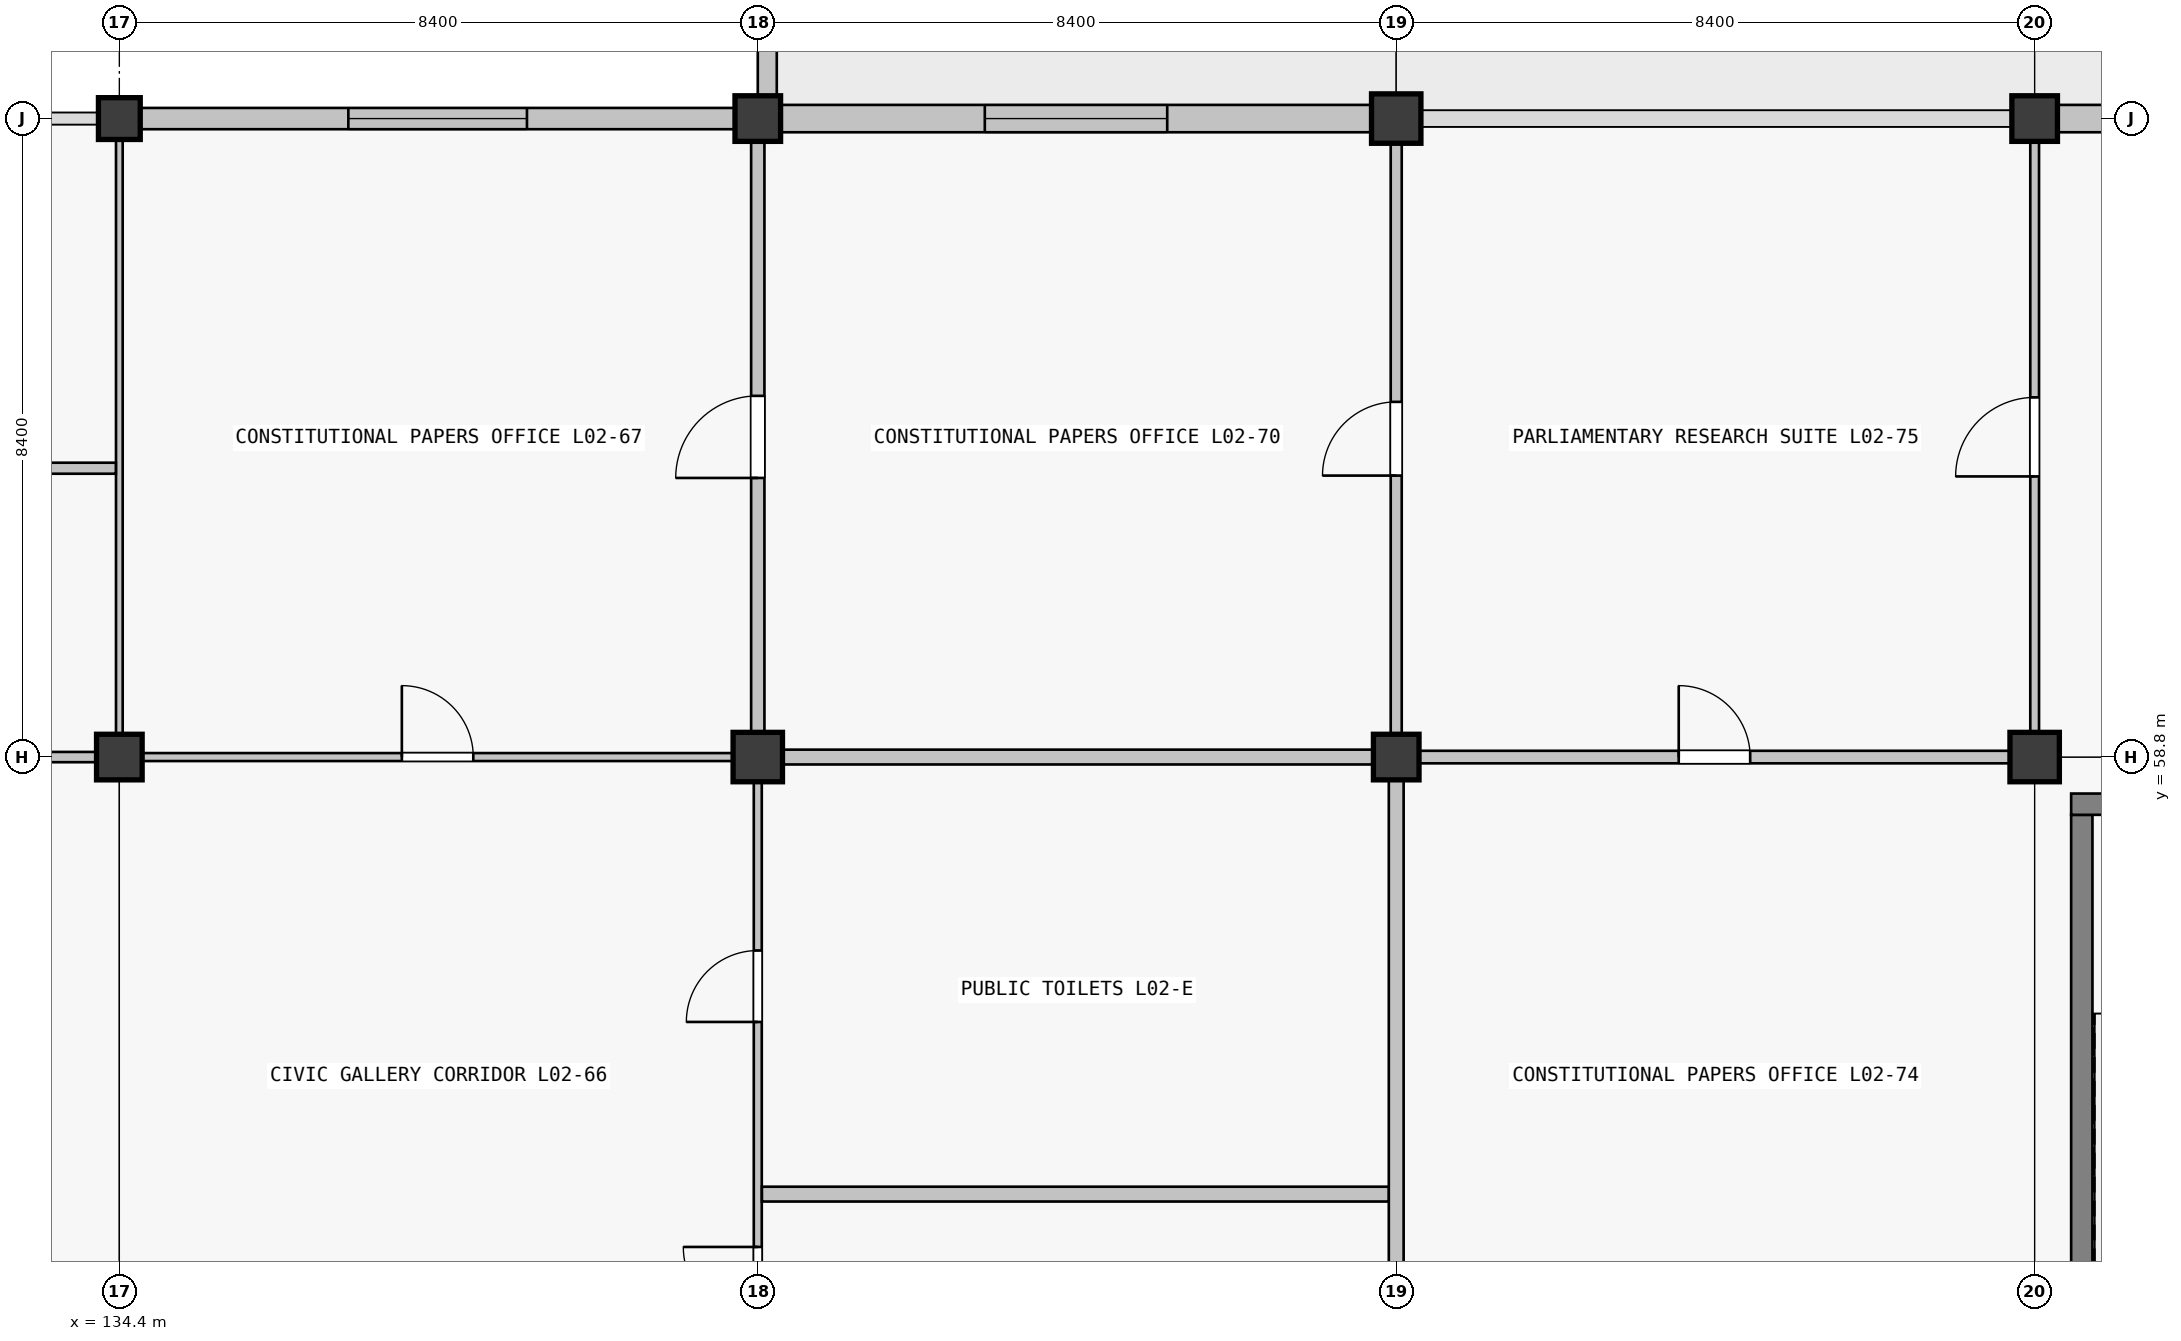
"""IFC4 building model, lengths in metres.
Left out: names, types, materials, properties, quantities, classifications, styles, units other than length and angle.
Written with IfcOpenShell. Run it as: python <this file> out.ifc"""

import sys

from ifc_helpers import new_model, si_unit, direction, frame, frame_2d, origin, origin_2d, place, context, subcontext, project, spatial, rectangle, extrude, element, fill, save


model = new_model("IFC4")
c1 = context("Model", 3, precision=1e-05, world=origin(), true_north=direction((0.0, 1.0)))
c2 = subcontext(c1, "Body", "Model", "MODEL_VIEW")
j1 = project(units=[si_unit("LENGTHUNIT", "METRE"), si_unit("PLANEANGLEUNIT", "RADIAN")], contexts=[c1])
p1 = place(None, origin())
s1 = spatial("IfcSite", under=j1, at=p1, CompositionType="ELEMENT")
p2 = place(p1, origin())
s2 = spatial("IfcBuilding", under=s1, at=p2, CompositionType="ELEMENT")
p3 = place(p2, frame((0.0, 0.0, 10.26)))
s3 = spatial("IfcBuildingStorey", under=s2, at=p3, CompositionType="ELEMENT", Elevation=10.26)
p4 = place(p3, frame((134.4, 58.8, 0.0), z_axis=(0.0, 0.0, 1.0), x_axis=(1.0, 0.0, 0.0)))
e1 = element("IfcColumn", 1, at=p4, inside=s3, PredefinedType="COLUMN", context=c2, shape_type="SweptSolid", body=[
    extrude(rectangle(XDim=0.6, YDim=0.6, at=origin_2d()), origin(), (0.0, 0.0, 1.0), 4.5),
])
p5 = place(p3, frame((134.4, 67.2, 0.0), z_axis=(0.0, 0.0, 1.0), x_axis=(1.0, 0.0, 0.0)))
e2 = element("IfcColumn", 2, at=p5, inside=s3, PredefinedType="COLUMN", context=c2, shape_type="SweptSolid", body=[
    extrude(rectangle(XDim=0.55, YDim=0.55, at=origin_2d()), origin(), (0.0, 0.0, 1.0), 4.25),
])
p6 = place(p3, frame((142.8, 58.8, 0.0), z_axis=(0.0, 0.0, 1.0), x_axis=(1.0, 0.0, 0.0)))
e3 = element("IfcColumn", 3, at=p6, inside=s3, PredefinedType="COLUMN", context=c2, shape_type="SweptSolid", body=[
    extrude(rectangle(XDim=0.65, YDim=0.65, at=origin_2d()), origin(), (0.0, 0.0, 1.0), 4.5),
])
for number, where, z_axis, x_axis in (
    (4, (142.8, 67.2, 0.0), (0.0, 0.0, 1.0), (1.0, 0.0, 0.0)),
    (5, (151.2, 58.8, 0.0), (0.0, 0.0, 1.0), (1.0, 0.0, 0.0)),
):
    element("IfcColumn", number, at=place(p3, frame(where, z_axis=z_axis, x_axis=x_axis)), inside=s3, PredefinedType="COLUMN", context=c2, shape_type="SweptSolid", body=[
        extrude(rectangle(XDim=0.6, YDim=0.6, at=origin_2d()), origin(), (0.0, 0.0, 1.0), 4.5),
    ])
for number, where, z_axis, x_axis in (
    (6, (151.2, 67.2, 0.0), (0.0, 0.0, 1.0), (1.0, 0.0, 0.0)),
    (7, (159.6, 58.8, 0.0), (0.0, 0.0, 1.0), (1.0, 0.0, 0.0)),
):
    element("IfcColumn", number, at=place(p3, frame(where, z_axis=z_axis, x_axis=x_axis)), inside=s3, PredefinedType="COLUMN", context=c2, shape_type="SweptSolid", body=[
        extrude(rectangle(XDim=0.65, YDim=0.65, at=origin_2d()), origin(), (0.0, 0.0, 1.0), 4.5),
    ])
p7 = place(p3, frame((159.6, 67.2, 0.0), z_axis=(0.0, 0.0, 1.0), x_axis=(1.0, 0.0, 0.0)))
e8 = element("IfcColumn", 8, at=p7, inside=s3, PredefinedType="COLUMN", context=c2, shape_type="SweptSolid", body=[
    extrude(rectangle(XDim=0.6, YDim=0.6, at=origin_2d()), origin(), (0.0, 0.0, 1.0), 4.5),
])
p8 = place(p3, frame((134.676, 67.2, 0.0), z_axis=(0.0, 0.0, 1.0), x_axis=(1.0, 0.0, 0.0)))
e9 = element("IfcWall", 9, at=p8, inside=s3, PredefinedType="SOLIDWALL", context=c2, shape_type="SweptSolid", body=[
    extrude(rectangle(XDim=7.823, YDim=0.28, at=frame_2d((3.912, 0.0))), origin(), (0.0, 0.0, 1.0), 3.54),
])
p9 = place(p8, frame((2.737, 0.0, 0.9)))
e10 = element("IfcOpeningElement", 10, at=p9, cuts=e9, PredefinedType="OPENING", context=c2, shape_type="SweptSolid", body=[
    extrude(rectangle(XDim=2.35, YDim=1.6, at=frame_2d((1.175, 0.8))), frame((0.0, 0.14, 0.0), z_axis=(0.0, -1.0, 0.0), x_axis=(1.0, 0.0, 0.0)), (0.0, 0.0, 1.0), 0.28),
])
p10 = place(p3, frame((143.101, 67.2, 0.0), z_axis=(0.0, 0.0, 1.0), x_axis=(1.0, 0.0, 0.0)))
e11 = element("IfcWall", 11, at=p10, inside=s3, PredefinedType="SOLIDWALL", context=c2, shape_type="SweptSolid", body=[
    extrude(rectangle(XDim=7.773, YDim=0.36, at=frame_2d((3.886, 0.0))), origin(), (0.0, 0.0, 1.0), 3.54),
])
p11 = place(p10, frame((2.686, 0.0, 0.9)))
e12 = element("IfcOpeningElement", 12, at=p11, cuts=e11, PredefinedType="OPENING", context=c2, shape_type="SweptSolid", body=[
    extrude(rectangle(XDim=2.4, YDim=1.8, at=frame_2d((1.2, 0.9))), frame((0.0, 0.18, 0.0), z_axis=(0.0, -1.0, 0.0), x_axis=(1.0, 0.0, 0.0)), (0.0, 0.0, 1.0), 0.36),
])
p12 = place(p3, frame((159.901, 67.2, 0.0), z_axis=(0.0, 0.0, 1.0), x_axis=(1.0, 0.0, 0.0)))
e13 = element("IfcWall", 13, at=p12, inside=s3, PredefinedType="SOLIDWALL", context=c2, shape_type="SweptSolid", body=[
    extrude(rectangle(XDim=7.773, YDim=0.36, at=frame_2d((3.887, 0.0))), origin(), (0.0, 0.0, 1.0), 3.54),
])
p13 = place(p12, frame((3.286, 0.0, 0.9)))
e14 = element("IfcOpeningElement", 14, at=p13, cuts=e13, PredefinedType="OPENING", context=c2, shape_type="SweptSolid", body=[
    extrude(rectangle(XDim=1.2, YDim=2.1, at=frame_2d((0.6, 1.05))), frame((0.0, 0.18, 0.0), z_axis=(0.0, -1.0, 0.0), x_axis=(1.0, 0.0, 0.0)), (0.0, 0.0, 1.0), 0.36),
])
p14 = place(p3, frame((142.925, 67.46, 0.0), z_axis=(0.0, 0.0, 1.0), x_axis=(0.0, 1.0, 0.0)))
e15 = element("IfcWall", 15, at=p14, inside=s3, PredefinedType="PARAPET", context=c2, shape_type="SweptSolid", body=[
    extrude(rectangle(XDim=7.88, YDim=0.25, at=frame_2d((3.94, 0.0))), origin(), (0.0, 0.0, 1.0), 0.95),
])
p15 = place(p3, frame((160.22, 51.16, 0.0), z_axis=(0.0, 0.0, 1.0), x_axis=(0.0, 1.0, 0.0)))
e16 = element("IfcWall", 16, at=p15, inside=s3, PredefinedType="SHEAR", context=c2, shape_type="SweptSolid", body=[
    extrude(rectangle(XDim=6.88, YDim=0.28, at=frame_2d((3.44, 0.0))), origin(), (0.0, 0.0, 1.0), 4.5),
])
p16 = place(p3, frame((160.08, 58.18, 0.0), z_axis=(0.0, 0.0, 1.0), x_axis=(1.0, 0.0, 0.0)))
e17 = element("IfcWall", 17, at=p16, inside=s3, PredefinedType="SHEAR", context=c2, shape_type="SweptSolid", body=[
    extrude(rectangle(XDim=7.44, YDim=0.28, at=frame_2d((3.72, 0.0))), origin(), (0.0, 0.0, 1.0), 4.5),
])
p17 = place(p3, frame((126.327, 58.8, 0.0), z_axis=(0.0, 0.0, 1.0), x_axis=(1.0, 0.0, 0.0)))
e18 = element("IfcWall", 18, at=p17, inside=s3, PredefinedType="PARTITIONING", context=c2, shape_type="SweptSolid", body=[
    extrude(rectangle(XDim=7.771, YDim=0.135, at=frame_2d((3.885, 0.0))), origin(), (0.0, 0.0, 1.0), 3.37),
])
p18 = place(p3, frame((134.702, 58.8, 0.0), z_axis=(0.0, 0.0, 1.0), x_axis=(1.0, 0.0, 0.0)))
e19 = element("IfcWall", 19, at=p18, inside=s3, PredefinedType="PARTITIONING", context=c2, shape_type="SweptSolid", body=[
    extrude(rectangle(XDim=7.771, YDim=0.105, at=frame_2d((3.885, 0.0))), origin(), (0.0, 0.0, 1.0), 3.37),
])
p19 = place(p18, frame((3.415, 0.0, 0.0)))
e20 = element("IfcOpeningElement", 20, at=p19, cuts=e19, PredefinedType="OPENING", context=c2, shape_type="SweptSolid", body=[
    extrude(rectangle(XDim=0.94, YDim=2.15, at=frame_2d((0.47, 1.075))), frame((0.0, 0.052, 0.0), z_axis=(0.0, -1.0, 0.0), x_axis=(1.0, 0.0, 0.0)), (0.0, 0.0, 1.0), 0.105),
])
p20 = place(p3, frame((143.127, 58.8, 0.0), z_axis=(0.0, 0.0, 1.0), x_axis=(1.0, 0.0, 0.0)))
e21 = element("IfcWall", 21, at=p20, inside=s3, PredefinedType="PARTITIONING", context=c2, shape_type="SweptSolid", body=[
    extrude(rectangle(XDim=7.771, YDim=0.195, at=frame_2d((3.885, 0.0))), origin(), (0.0, 0.0, 1.0), 3.37),
])
p21 = place(p3, frame((151.502, 58.8, 0.0), z_axis=(0.0, 0.0, 1.0), x_axis=(1.0, 0.0, 0.0)))
e22 = element("IfcWall", 22, at=p21, inside=s3, PredefinedType="PARTITIONING", context=c2, shape_type="SweptSolid", body=[
    extrude(rectangle(XDim=7.771, YDim=0.165, at=frame_2d((3.885, 0.0))), origin(), (0.0, 0.0, 1.0), 3.37),
])
p22 = place(p21, frame((3.415, 0.0, 0.0)))
e23 = element("IfcOpeningElement", 23, at=p22, cuts=e22, PredefinedType="OPENING", context=c2, shape_type="SweptSolid", body=[
    extrude(rectangle(XDim=0.94, YDim=2.15, at=frame_2d((0.47, 1.075))), frame((0.0, 0.083, 0.0), z_axis=(0.0, -1.0, 0.0), x_axis=(1.0, 0.0, 0.0)), (0.0, 0.0, 1.0), 0.165),
])
p23 = place(p3, frame((134.4, 59.102, 0.0), z_axis=(0.0, 0.0, 1.0), x_axis=(0.0, 1.0, 0.0)))
e24 = element("IfcWall", 24, at=p23, inside=s3, PredefinedType="PARTITIONING", context=c2, shape_type="SweptSolid", body=[
    extrude(rectangle(XDim=7.821, YDim=0.088, at=frame_2d((3.911, 0.0))), origin(), (0.0, 0.0, 1.0), 3.37),
])
p24 = place(p3, frame((142.8, 50.702, 0.0), z_axis=(0.0, 0.0, 1.0), x_axis=(0.0, 1.0, 0.0)))
e25 = element("IfcWall", 25, at=p24, inside=s3, PredefinedType="PARTITIONING", context=c2, shape_type="SweptSolid", body=[
    extrude(rectangle(XDim=7.771, YDim=0.105, at=frame_2d((3.885, 0.0))), origin(), (0.0, 0.0, 1.0), 3.37),
])
p25 = place(p24, frame((0.673, 0.0, 0.0)))
e26 = element("IfcOpeningElement", 26, at=p25, cuts=e25, PredefinedType="OPENING", context=c2, shape_type="SweptSolid", body=[
    extrude(rectangle(XDim=0.98, YDim=2.08, at=frame_2d((0.49, 1.04))), frame((0.0, 0.052, 0.0), z_axis=(0.0, -1.0, 0.0), x_axis=(1.0, 0.0, 0.0)), (0.0, 0.0, 1.0), 0.105),
])
p26 = place(p24, frame((4.613, 0.0, 0.0)))
e27 = element("IfcOpeningElement", 27, at=p26, cuts=e25, PredefinedType="OPENING", context=c2, shape_type="SweptSolid", body=[
    extrude(rectangle(XDim=0.94, YDim=2.08, at=frame_2d((0.47, 1.04))), frame((0.0, 0.052, 0.0), z_axis=(0.0, -1.0, 0.0), x_axis=(1.0, 0.0, 0.0)), (0.0, 0.0, 1.0), 0.105),
])
p27 = place(p3, frame((142.8, 59.127, 0.0), z_axis=(0.0, 0.0, 1.0), x_axis=(0.0, 1.0, 0.0)))
e28 = element("IfcWall", 28, at=p27, inside=s3, PredefinedType="PARTITIONING", context=c2, shape_type="SweptSolid", body=[
    extrude(rectangle(XDim=7.771, YDim=0.175, at=frame_2d((3.885, 0.0))), origin(), (0.0, 0.0, 1.0), 3.37),
])
p28 = place(p27, frame((3.345, 0.0, 0.0)))
e29 = element("IfcOpeningElement", 29, at=p28, cuts=e28, PredefinedType="OPENING", context=c2, shape_type="SweptSolid", body=[
    extrude(rectangle(XDim=1.08, YDim=2.25, at=frame_2d((0.54, 1.125))), frame((0.0, 0.087, 0.0), z_axis=(0.0, -1.0, 0.0), x_axis=(1.0, 0.0, 0.0)), (0.0, 0.0, 1.0), 0.175),
])
p29 = place(p3, frame((151.2, 50.727, 0.0), z_axis=(0.0, 0.0, 1.0), x_axis=(0.0, 1.0, 0.0)))
e30 = element("IfcWall", 30, at=p29, inside=s3, PredefinedType="PARTITIONING", context=c2, shape_type="SweptSolid", body=[
    extrude(rectangle(XDim=7.771, YDim=0.195, at=frame_2d((3.885, 0.0))), origin(), (0.0, 0.0, 1.0), 3.37),
])
p30 = place(p3, frame((151.2, 59.102, 0.0), z_axis=(0.0, 0.0, 1.0), x_axis=(0.0, 1.0, 0.0)))
e31 = element("IfcWall", 31, at=p30, inside=s3, PredefinedType="PARTITIONING", context=c2, shape_type="SweptSolid", body=[
    extrude(rectangle(XDim=7.771, YDim=0.145, at=frame_2d((3.885, 0.0))), origin(), (0.0, 0.0, 1.0), 3.37),
])
p31 = place(p30, frame((3.401, 0.0, 0.0)))
e32 = element("IfcOpeningElement", 32, at=p31, cuts=e31, PredefinedType="OPENING", context=c2, shape_type="SweptSolid", body=[
    extrude(rectangle(XDim=0.97, YDim=2.12, at=frame_2d((0.485, 1.06))), frame((0.0, 0.073, 0.0), z_axis=(0.0, -1.0, 0.0), x_axis=(1.0, 0.0, 0.0)), (0.0, 0.0, 1.0), 0.145),
])
p32 = place(p3, frame((159.6, 59.127, 0.0), z_axis=(0.0, 0.0, 1.0), x_axis=(0.0, 1.0, 0.0)))
e33 = element("IfcWall", 33, at=p32, inside=s3, PredefinedType="PARTITIONING", context=c2, shape_type="SweptSolid", body=[
    extrude(rectangle(XDim=7.771, YDim=0.115, at=frame_2d((3.885, 0.0))), origin(), (0.0, 0.0, 1.0), 3.37),
])
p33 = place(p32, frame((3.365, 0.0, 0.0)))
e34 = element("IfcOpeningElement", 34, at=p33, cuts=e33, PredefinedType="OPENING", context=c2, shape_type="SweptSolid", body=[
    extrude(rectangle(XDim=1.04, YDim=2.2, at=frame_2d((0.52, 1.1))), frame((0.0, 0.058, 0.0), z_axis=(0.0, -1.0, 0.0), x_axis=(1.0, 0.0, 0.0)), (0.0, 0.0, 1.0), 0.115),
])
p34 = place(p3, frame((126.06, 62.6, 0.0), z_axis=(0.0, 0.0, 1.0), x_axis=(1.0, 0.0, 0.0)))
e35 = element("IfcWall", 35, at=p34, inside=s3, PredefinedType="PARTITIONING", context=c2, shape_type="SweptSolid", body=[
    extrude(rectangle(XDim=8.294, YDim=0.145, at=frame_2d((4.147, 0.0))), origin(), (0.0, 0.0, 1.0), 3.37),
])
p35 = place(p3, frame((142.854, 53.05, 0.0), z_axis=(0.0, 0.0, 1.0), x_axis=(1.0, 0.0, 0.0)))
e36 = element("IfcWall", 36, at=p35, inside=s3, PredefinedType="PARTITIONING", context=c2, shape_type="SweptSolid", body=[
    extrude(rectangle(XDim=8.246, YDim=0.195, at=frame_2d((4.123, 0.0))), origin(), (0.0, 0.0, 1.0), 3.37),
])
p36 = place(p9, origin())
e37 = element("IfcWindow", 37, at=p36, inside=s3, PartitioningType="SINGLE_PANEL", PredefinedType="WINDOW", context=c2, shape_type="SweptSolid", body=[
    extrude(rectangle(XDim=2.35, YDim=1.6, at=frame_2d((1.175, 0.8))), frame((0.0, 0.03, 0.0), z_axis=(0.0, -1.0, 0.0), x_axis=(1.0, 0.0, 0.0)), (0.0, 0.0, 1.0), 0.06),
])
fill(e10, e37)
p37 = place(p11, origin())
e38 = element("IfcWindow", 38, at=p37, inside=s3, PartitioningType="SINGLE_PANEL", PredefinedType="WINDOW", context=c2, shape_type="SweptSolid", body=[
    extrude(rectangle(XDim=2.4, YDim=1.8, at=frame_2d((1.2, 0.9))), frame((0.0, 0.03, 0.0), z_axis=(0.0, -1.0, 0.0), x_axis=(1.0, 0.0, 0.0)), (0.0, 0.0, 1.0), 0.06),
])
fill(e12, e38)
p38 = place(p25, origin())
e39 = element("IfcDoor", 39, at=p38, inside=s3, OperationType="SINGLE_SWING_RIGHT", PredefinedType="DOOR", context=c2, shape_type="SweptSolid", body=[
    extrude(rectangle(XDim=0.98, YDim=2.08, at=frame_2d((0.49, 1.04))), frame((0.0, 0.025, 0.0), z_axis=(0.0, -1.0, 0.0), x_axis=(1.0, 0.0, 0.0)), (0.0, 0.0, 1.0), 0.05),
])
fill(e26, e39)
p39 = place(p26, origin())
e40 = element("IfcDoor", 40, at=p39, inside=s3, OperationType="SINGLE_SWING_LEFT", PredefinedType="DOOR", context=c2, shape_type="SweptSolid", body=[
    extrude(rectangle(XDim=0.94, YDim=2.08, at=frame_2d((0.47, 1.04))), frame((0.0, 0.025, 0.0), z_axis=(0.0, -1.0, 0.0), x_axis=(1.0, 0.0, 0.0)), (0.0, 0.0, 1.0), 0.05),
])
fill(e27, e40)
p40 = place(p19, origin())
e41 = element("IfcDoor", 41, at=p40, inside=s3, OperationType="SINGLE_SWING_LEFT", PredefinedType="DOOR", context=c2, shape_type="SweptSolid", body=[
    extrude(rectangle(XDim=0.94, YDim=2.15, at=frame_2d((0.47, 1.075))), frame((0.0, 0.025, 0.0), z_axis=(0.0, -1.0, 0.0), x_axis=(1.0, 0.0, 0.0)), (0.0, 0.0, 1.0), 0.05),
])
fill(e20, e41)
p41 = place(p22, origin())
e42 = element("IfcDoor", 42, at=p41, inside=s3, OperationType="SINGLE_SWING_LEFT", PredefinedType="DOOR", context=c2, shape_type="SweptSolid", body=[
    extrude(rectangle(XDim=0.94, YDim=2.15, at=frame_2d((0.47, 1.075))), frame((0.0, 0.025, 0.0), z_axis=(0.0, -1.0, 0.0), x_axis=(1.0, 0.0, 0.0)), (0.0, 0.0, 1.0), 0.05),
])
fill(e23, e42)
p42 = place(p28, origin())
e43 = element("IfcDoor", 43, at=p42, inside=s3, OperationType="SINGLE_SWING_LEFT", PredefinedType="DOOR", context=c2, shape_type="SweptSolid", body=[
    extrude(rectangle(XDim=1.08, YDim=2.25, at=frame_2d((0.54, 1.125))), frame((0.0, 0.025, 0.0), z_axis=(0.0, -1.0, 0.0), x_axis=(1.0, 0.0, 0.0)), (0.0, 0.0, 1.0), 0.05),
])
fill(e29, e43)
p43 = place(p33, origin())
e44 = element("IfcDoor", 44, at=p43, inside=s3, OperationType="SINGLE_SWING_LEFT", PredefinedType="DOOR", context=c2, shape_type="SweptSolid", body=[
    extrude(rectangle(XDim=1.04, YDim=2.2, at=frame_2d((0.52, 1.1))), frame((0.0, 0.025, 0.0), z_axis=(0.0, -1.0, 0.0), x_axis=(1.0, 0.0, 0.0)), (0.0, 0.0, 1.0), 0.05),
])
fill(e34, e44)
p44 = place(p31, origin())
e45 = element("IfcDoor", 45, at=p44, inside=s3, OperationType="SINGLE_SWING_LEFT", PredefinedType="DOOR", context=c2, shape_type="SweptSolid", body=[
    extrude(rectangle(XDim=0.97, YDim=2.12, at=frame_2d((0.485, 1.06))), frame((0.0, 0.025, 0.0), z_axis=(0.0, -1.0, 0.0), x_axis=(1.0, 0.0, 0.0)), (0.0, 0.0, 1.0), 0.05),
])
fill(e32, e45)
save(model, sys.argv[1])
